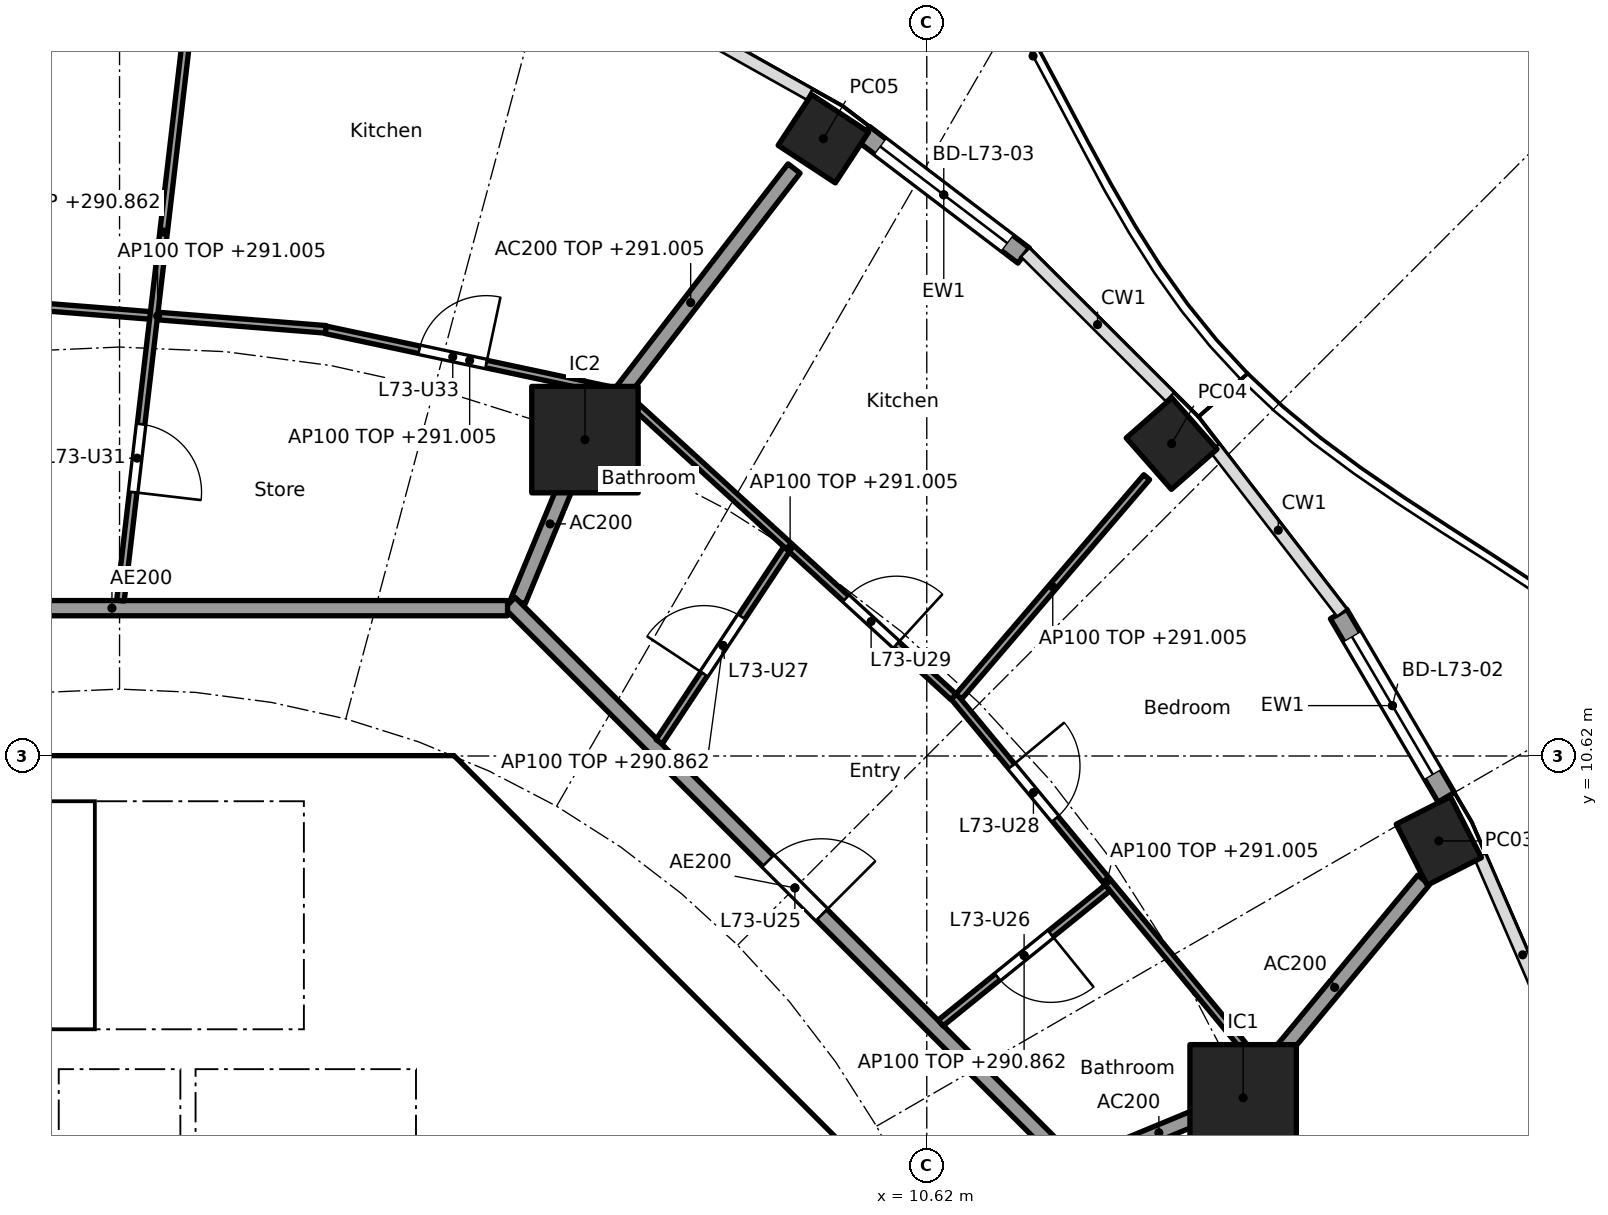
"""IFC4 building model, lengths in metres.
Left out: names, types, materials, properties, quantities, classifications, styles, units other than length and angle.
Written with IfcOpenShell. Run it as: python <this file> out.ifc"""

import sys

from ifc_helpers import new_model, si_unit, direction, frame, frame_2d, origin, origin_2d, place, context, subcontext, project, spatial, polyline, rectangle, hollow_rectangle, outline, extrude, element, fill, save


model = new_model("IFC4")
c1 = context("Model", 3, precision=1e-05, world=origin(), true_north=direction((0.0, 1.0)))
c2 = subcontext(c1, "Body", "Model", "MODEL_VIEW")
j1 = project(units=[si_unit("LENGTHUNIT", "METRE"), si_unit("PLANEANGLEUNIT", "RADIAN")], contexts=[c1])
p1 = place(None, origin())
s1 = spatial("IfcSite", under=j1, at=p1, CompositionType="ELEMENT")
p2 = place(p1, origin())
s2 = spatial("IfcBuilding", under=s1, at=p2, CompositionType="ELEMENT")
p3 = place(p2, frame((0.0, 0.0, 288.1)))
s3 = spatial("IfcBuildingStorey", under=s2, at=p3, CompositionType="ELEMENT", Elevation=288.1)
for number, where, z_axis, x_axis in (
    (1, (17.356, 9.502, 0.0), (0.0, 0.0, 1.0), (-0.452, 0.892, 0.0)),
    (2, (13.841, 14.73, 0.0), (0.0, 0.0, 1.0), (-0.66, 0.751, 0.0)),
    (3, (9.26, 18.741, 0.0), (0.0, 0.0, 1.0), (-0.836, 0.549, 0.0)),
):
    element("IfcColumn", number, at=place(p3, frame(where, z_axis=z_axis, x_axis=x_axis)), inside=s3, PredefinedType="COLUMN", context=c2, shape_type="SweptSolid", body=[
        extrude(hollow_rectangle(XDim=0.9, YDim=0.8, WallThickness=0.028, at=origin_2d()), origin(), (0.0, 0.0, 1.0), 3.7),
    ])
for number, where, z_axis, x_axis in (
    (4, (14.782, 6.123, 0.0), (0.0, 0.0, 1.0), (1.0, 0.0, 0.0)),
    (5, (6.123, 14.782, 0.0), (0.0, 0.0, 1.0), (1.0, 0.0, 0.0)),
):
    element("IfcColumn", number, at=place(p3, frame(where, z_axis=z_axis, x_axis=x_axis)), inside=s3, PredefinedType="COLUMN", context=c2, shape_type="SweptSolid", body=[
        extrude(rectangle(XDim=1.4, YDim=1.4, at=origin_2d()), origin(), (0.0, 0.0, 1.0), 3.7),
    ])
p4 = place(p3, frame((16.038, 12.489, 0.0), z_axis=(0.0, 0.0, 1.0), x_axis=(0.506371364425, -0.862315511452, 0.0)))
e6 = element("IfcWall", 6, at=p4, inside=s3, PredefinedType="SOLIDWALL", context=c2, shape_type="SweptSolid", body=[
    extrude(rectangle(XDim=2.796, YDim=0.25, at=frame_2d((1.398, 0.0))), origin(), (0.0, 0.0, 1.0), 3.44),
])
p5 = place(p4, frame((0.348, 0.0, 0.0)))
e7 = element("IfcOpeningElement", 7, at=p5, cuts=e6, PredefinedType="OPENING", context=c2, shape_type="SweptSolid", body=[
    extrude(rectangle(XDim=2.1, YDim=2.4, at=frame_2d((1.05, 1.2))), frame((0.0, 0.135, 0.0), z_axis=(0.0, -1.0, 0.0), x_axis=(1.0, 0.0, 0.0)), (0.0, 0.0, 1.0), 0.27),
])
p6 = place(p3, frame((9.792, 18.802, 0.0), z_axis=(0.0, 0.0, 1.0), x_axis=(0.796010739377, -0.605282498339, 0.0)))
e8 = element("IfcWall", 8, at=p6, inside=s3, PredefinedType="SOLIDWALL", context=c2, shape_type="SweptSolid", body=[
    extrude(rectangle(XDim=2.641, YDim=0.25, at=frame_2d((1.32, 0.0))), origin(), (0.0, 0.0, 1.0), 3.44),
])
p7 = place(p6, frame((0.27, 0.0, 0.0)))
e9 = element("IfcOpeningElement", 9, at=p7, cuts=e8, PredefinedType="OPENING", context=c2, shape_type="SweptSolid", body=[
    extrude(rectangle(XDim=2.1, YDim=2.4, at=frame_2d((1.05, 1.2))), frame((0.0, 0.135, 0.0), z_axis=(0.0, -1.0, 0.0), x_axis=(1.0, 0.0, 0.0)), (0.0, 0.0, 1.0), 0.27),
])
p8 = place(p3, frame((9.988, 4.613, 0.0), z_axis=(0.0, 0.0, 1.0), x_axis=(-0.707106781187, 0.707106781187, 0.0)))
e10 = element("IfcWall", 10, at=p8, inside=s3, PredefinedType="SHEAR", context=c2, shape_type="SweptSolid", body=[
    extrude(rectangle(XDim=7.602, YDim=0.6, at=frame_2d((3.801, 0.0))), origin(), (0.0, 0.0, 1.0), 3.44),
])
p9 = place(p8, frame((3.201, 0.0, 0.0)))
e11 = element("IfcOpeningElement", 11, at=p9, cuts=e10, PredefinedType="OPENING", context=c2, shape_type="SweptSolid", body=[
    extrude(rectangle(XDim=1.2, YDim=2.1, at=frame_2d((0.6, 1.05))), frame((0.0, 0.31, 0.0), z_axis=(0.0, -1.0, 0.0), x_axis=(1.0, 0.0, 0.0)), (0.0, 0.0, 1.0), 0.62),
])
p10 = place(p3, frame((4.0, 4.3, 0.0), z_axis=(0.0, 0.0, 1.0), x_axis=(0.0, 1.0, 0.0)))
e12 = element("IfcWall", 12, at=p10, inside=s3, PredefinedType="SOLIDWALL", context=c2, shape_type="SweptSolid", body=[
    extrude(rectangle(XDim=2.2, YDim=0.2, at=frame_2d((1.1, 0.0))), origin(), (0.0, 0.0, 1.0), 3.44),
])
p11 = place(p10, frame((0.55, 0.0, 0.0)))
e13 = element("IfcOpeningElement", 13, at=p11, cuts=e12, PredefinedType="OPENING", context=c2, shape_type="SweptSolid", body=[
    extrude(rectangle(XDim=1.1, YDim=2.1, at=frame_2d((0.55, 1.05))), frame((0.0, 0.11, 0.0), z_axis=(0.0, -1.0, 0.0), x_axis=(1.0, 0.0, 0.0)), (0.0, 0.0, 1.0), 0.22),
])
p12 = place(p3, frame((4.0, 7.025, 0.0), z_axis=(0.0, 0.0, 1.0), x_axis=(0.0, 1.0, 0.0)))
e14 = element("IfcWall", 14, at=p12, inside=s3, PredefinedType="SOLIDWALL", context=c2, shape_type="SweptSolid", body=[
    extrude(rectangle(XDim=3.0, YDim=0.2, at=frame_2d((1.5, 0.0))), origin(), (0.0, 0.0, 1.0), 3.44),
])
p13 = place(p12, frame((0.925, 0.0, 0.0)))
e15 = element("IfcOpeningElement", 15, at=p13, cuts=e14, PredefinedType="OPENING", context=c2, shape_type="SweptSolid", body=[
    extrude(rectangle(XDim=1.1, YDim=2.1, at=frame_2d((0.55, 1.05))), frame((0.0, 0.11, 0.0), z_axis=(0.0, -1.0, 0.0), x_axis=(1.0, 0.0, 0.0)), (0.0, 0.0, 1.0), 0.22),
])
p14 = place(p3, origin())
e16 = element("IfcWall", 16, at=p14, inside=s3, PredefinedType="SHEAR", context=c2, shape_type="SweptSolid", body=[
    extrude(outline(polyline([(-4.152, 10.025), (-4.401, 9.776), (-4.825, 10.2), (-4.401, 10.625), (4.401, 10.625), (4.825, 10.2), (4.401, 9.776), (4.152, 10.025), (-4.152, 10.025)])), origin(), (0.0, 0.0, 1.0), 3.44),
])
for number, where, z_axis, x_axis in (
    (17, (-0.9, 4.3, 0.0), (0.0, 0.0, 1.0), (0.0, 1.0, 0.0)),
    (18, (0.9, 4.3, 0.0), (0.0, 0.0, 1.0), (0.0, 1.0, 0.0)),
):
    element("IfcWall", number, at=place(p3, frame(where, z_axis=z_axis, x_axis=x_axis)), inside=s3, PredefinedType="SOLIDWALL", context=c2, shape_type="SweptSolid", body=[
        extrude(rectangle(XDim=2.2, YDim=0.2, at=frame_2d((1.1, 0.0))), origin(), (0.0, 0.0, 1.0), 3.44),
    ])
p15 = place(p3, origin())
e19 = element("IfcWall", 19, at=p15, inside=s3, PredefinedType="SOLIDWALL", context=c2, shape_type="SweptSolid", body=[
    extrude(outline(polyline([(4.1, 6.5), (-4.1, 6.5), (-4.1, 7.025), (4.1, 7.025), (4.1, 6.5)])), origin(), (0.0, 0.0, 1.0), 3.44),
])
p16 = place(p3, frame((12.657, 5.243, 0.0), z_axis=(0.0, 0.0, 1.0), x_axis=(0.923853160736, 0.382747093259, 0.0)))
e20 = element("IfcWall", 20, at=p16, inside=s3, PredefinedType="PARTITIONING", context=c2, shape_type="SweptSolid", body=[
    extrude(rectangle(XDim=2.2, YDim=0.2, at=frame_2d((1.1, 0.0))), origin(), (0.0, 0.0, 1.0), 3.44),
])
p17 = place(p3, frame((14.814, 6.161, 0.0), z_axis=(0.0, 0.0, 1.0), x_axis=(0.638050520313, 0.769994502272, 0.0)))
e21 = element("IfcWall", 21, at=p17, inside=s3, PredefinedType="PARTITIONING", context=c2, shape_type="SweptSolid", body=[
    extrude(rectangle(XDim=3.673, YDim=0.2, at=frame_2d((1.836, 0.0))), origin(), (0.0, 0.0, 1.0), 3.44),
])
p18 = place(p3, frame((5.243, 12.657, 0.0), z_axis=(0.0, 0.0, 1.0), x_axis=(0.382691608661, 0.923876145736, 0.0)))
e22 = element("IfcWall", 22, at=p18, inside=s3, PredefinedType="PARTITIONING", context=c2, shape_type="SweptSolid", body=[
    extrude(rectangle(XDim=2.2, YDim=0.2, at=frame_2d((1.1, 0.0))), origin(), (0.0, 0.0, 1.0), 3.44),
])
p19 = place(p3, frame((6.154, 14.822, 0.0), z_axis=(0.0, 0.0, 1.0), x_axis=(0.610687612043, 0.791871606068, 0.0)))
e23 = element("IfcWall", 23, at=p19, inside=s3, PredefinedType="PARTITIONING", context=c2, shape_type="SweptSolid", body=[
    extrude(rectangle(XDim=4.455, YDim=0.2, at=frame_2d((2.228, 0.0))), origin(), (0.0, 0.0, 1.0), 2.905),
])
p20 = place(p3, frame((12.635, 5.134, 0.0), z_axis=(0.0, 0.0, 1.0), x_axis=(-0.707106781187, 0.707106781187, 0.0)))
e24 = element("IfcWall", 24, at=p20, inside=s3, PredefinedType="PARTITIONING", context=c2, shape_type="SweptSolid", body=[
    extrude(rectangle(XDim=10.609, YDim=0.2, at=frame_2d((5.305, 0.0))), origin(), (0.0, 0.0, 1.0), 3.44),
])
p21 = place(p20, frame((4.804, 0.0, 0.0)))
e25 = element("IfcOpeningElement", 25, at=p21, cuts=e24, PredefinedType="OPENING", context=c2, shape_type="SweptSolid", body=[
    extrude(rectangle(XDim=1.0, YDim=2.1, at=frame_2d((0.5, 1.05))), frame((0.0, 0.11, 0.0), z_axis=(0.0, -1.0, 0.0), x_axis=(1.0, 0.0, 0.0)), (0.0, 0.0, 1.0), 0.22),
])
p22 = place(p3, frame((5.104, 12.565, 0.0), z_axis=(0.0, 0.0, 1.0), x_axis=(-1.0, 0.0, 0.0)))
e26 = element("IfcWall", 26, at=p22, inside=s3, PredefinedType="PARTITIONING", context=c2, shape_type="SweptSolid", body=[
    extrude(rectangle(XDim=10.409, YDim=0.2, at=frame_2d((5.205, 0.0))), origin(), (0.0, 0.0, 1.0), 3.44),
])
p23 = place(p22, frame((6.339, 0.0, 0.0)))
e27 = element("IfcOpeningElement", 27, at=p23, cuts=e26, PredefinedType="OPENING", context=c2, shape_type="SweptSolid", body=[
    extrude(rectangle(XDim=1.0, YDim=2.1, at=frame_2d((0.5, 1.05))), frame((0.0, 0.11, 0.0), z_axis=(0.0, -1.0, 0.0), x_axis=(1.0, 0.0, 0.0)), (0.0, 0.0, 1.0), 0.22),
])
p24 = place(p3, frame((15.552, 2.508, 0.0), z_axis=(0.0, 0.0, 1.0), x_axis=(-0.12196293976, 0.992534654974, 0.0)))
e28 = element("IfcWall", 28, at=p24, inside=s3, PredefinedType="PARTITIONING", context=c2, shape_type="SweptSolid", body=[
    extrude(rectangle(XDim=3.887, YDim=0.1, at=frame_2d((1.944, 0.0))), origin(), (0.0, 0.0, 1.0), 2.905),
])
p25 = place(p3, frame((15.002, 6.543, 0.0), z_axis=(0.0, 0.0, 1.0), x_axis=(-0.637932656528, 0.770092154054, 0.0)))
e29 = element("IfcWall", 29, at=p25, inside=s3, PredefinedType="PARTITIONING", context=c2, shape_type="SweptSolid", body=[
    extrude(rectangle(XDim=6.311, YDim=0.1, at=frame_2d((3.155, 0.0))), origin(), (0.0, 0.0, 1.0), 2.905),
])
p26 = place(p25, frame((4.22, 0.0, 0.0)))
e30 = element("IfcOpeningElement", 30, at=p26, cuts=e29, PredefinedType="OPENING", context=c2, shape_type="SweptSolid", body=[
    extrude(rectangle(XDim=0.9, YDim=2.1, at=frame_2d((0.45, 1.05))), frame((0.0, 0.06, 0.0), z_axis=(0.0, -1.0, 0.0), x_axis=(1.0, 0.0, 0.0)), (0.0, 0.0, 1.0), 0.12),
])
p27 = place(p3, frame((10.802, 7.107, 0.0), z_axis=(0.0, 0.0, 1.0), x_axis=(0.777526610395, 0.628850037868, 0.0)))
e31 = element("IfcWall", 31, at=p27, inside=s3, PredefinedType="PARTITIONING", context=c2, shape_type="SweptSolid", body=[
    extrude(rectangle(XDim=2.824, YDim=0.1, at=frame_2d((1.412, 0.0))), origin(), (0.0, 0.0, 1.0), 2.762),
])
p28 = place(p27, frame((0.962, 0.0, 0.0)))
e32 = element("IfcOpeningElement", 32, at=p28, cuts=e31, PredefinedType="OPENING", context=c2, shape_type="SweptSolid", body=[
    extrude(rectangle(XDim=0.9, YDim=2.1, at=frame_2d((0.45, 1.05))), frame((0.0, 0.06, 0.0), z_axis=(0.0, -1.0, 0.0), x_axis=(1.0, 0.0, 0.0)), (0.0, 0.0, 1.0), 0.12),
])
p29 = place(p3, frame((11.041, 11.402, 0.0), z_axis=(0.0, 0.0, 1.0), x_axis=(0.650558544325, 0.759456108282, 0.0)))
e33 = element("IfcWall", 33, at=p29, inside=s3, PredefinedType="PARTITIONING", context=c2, shape_type="SweptSolid", body=[
    extrude(rectangle(XDim=3.8, YDim=0.1, at=frame_2d((1.9, 0.0))), origin(), (0.0, 0.0, 1.0), 2.905),
])
p30 = place(p3, frame((10.972, 11.398, 0.0), z_axis=(0.0, 0.0, 1.0), x_axis=(-0.737830272434, 0.674986288069, 0.0)))
e34 = element("IfcWall", 34, at=p30, inside=s3, PredefinedType="PARTITIONING", context=c2, shape_type="SweptSolid", body=[
    extrude(rectangle(XDim=5.827, YDim=0.1, at=frame_2d((2.914, 0.0))), origin(), (0.0, 0.0, 1.0), 2.905),
])
p31 = place(p30, frame((1.019, 0.0, 0.0)))
e35 = element("IfcOpeningElement", 35, at=p31, cuts=e34, PredefinedType="OPENING", context=c2, shape_type="SweptSolid", body=[
    extrude(rectangle(XDim=0.9, YDim=2.1, at=frame_2d((0.45, 1.05))), frame((0.0, 0.06, 0.0), z_axis=(0.0, -1.0, 0.0), x_axis=(1.0, 0.0, 0.0)), (0.0, 0.0, 1.0), 0.12),
])
p32 = place(p3, frame((7.1, 10.808, 0.0), z_axis=(0.0, 0.0, 1.0), x_axis=(0.55204370542, 0.833815175747, 0.0)))
e36 = element("IfcWall", 36, at=p32, inside=s3, PredefinedType="PARTITIONING", context=c2, shape_type="SweptSolid", body=[
    extrude(rectangle(XDim=3.036, YDim=0.1, at=frame_2d((1.518, 0.0))), origin(), (0.0, 0.0, 1.0), 2.762),
])
p33 = place(p32, frame((1.068, 0.0, 0.0)))
e37 = element("IfcOpeningElement", 37, at=p33, cuts=e36, PredefinedType="OPENING", context=c2, shape_type="SweptSolid", body=[
    extrude(rectangle(XDim=0.9, YDim=2.1, at=frame_2d((0.45, 1.05))), frame((0.0, 0.06, 0.0), z_axis=(0.0, -1.0, 0.0), x_axis=(1.0, 0.0, 0.0)), (0.0, 0.0, 1.0), 0.12),
])
p34 = place(p3, frame((6.5, 15.419, 0.0), z_axis=(0.0, 0.0, 1.0), x_axis=(-0.978053492557, 0.208353943321, 0.0)))
e38 = element("IfcWall", 38, at=p34, inside=s3, PredefinedType="PARTITIONING", context=c2, shape_type="SweptSolid", body=[
    extrude(rectangle(XDim=3.874, YDim=0.1, at=frame_2d((1.937, 0.0))), origin(), (0.0, 0.0, 1.0), 2.905),
])
p35 = place(p34, frame((1.714, 0.0, 0.0)))
e39 = element("IfcOpeningElement", 39, at=p35, cuts=e38, PredefinedType="OPENING", context=c2, shape_type="SweptSolid", body=[
    extrude(rectangle(XDim=0.9, YDim=2.1, at=frame_2d((0.45, 1.05))), frame((0.0, 0.06, 0.0), z_axis=(0.0, -1.0, 0.0), x_axis=(1.0, 0.0, 0.0)), (0.0, 0.0, 1.0), 0.12),
])
p36 = place(p3, frame((2.713, 16.233, 0.0), z_axis=(0.0, 0.0, 1.0), x_axis=(-0.996870142942, 0.079056423588, 0.0)))
e40 = element("IfcWall", 40, at=p36, inside=s3, PredefinedType="PARTITIONING", context=c2, shape_type="SweptSolid", body=[
    extrude(rectangle(XDim=4.438, YDim=0.1, at=frame_2d((2.219, 0.0))), origin(), (0.0, 0.0, 1.0), 2.905),
])
p37 = place(p3, frame((0.012, 12.664, 0.0), z_axis=(0.0, 0.0, 1.0), x_axis=(0.11636251357, 0.993206808996, 0.0)))
e41 = element("IfcWall", 41, at=p37, inside=s3, PredefinedType="PARTITIONING", context=c2, shape_type="SweptSolid", body=[
    extrude(rectangle(XDim=9.765, YDim=0.1, at=frame_2d((4.882, 0.0))), origin(), (0.0, 0.0, 1.0), 2.762),
])
p38 = place(p37, frame((1.437, 0.0, 0.0)))
e42 = element("IfcOpeningElement", 42, at=p38, cuts=e41, PredefinedType="OPENING", context=c2, shape_type="SweptSolid", body=[
    extrude(rectangle(XDim=0.9, YDim=2.1, at=frame_2d((0.45, 1.05))), frame((0.0, 0.06, 0.0), z_axis=(0.0, -1.0, 0.0), x_axis=(1.0, 0.0, 0.0)), (0.0, 0.0, 1.0), 0.12),
])
p39 = place(p5, origin())
e43 = element("IfcDoor", 43, at=p39, inside=s3, OperationType="SLIDING_TO_LEFT", PredefinedType="DOOR", context=c2, shape_type="SweptSolid", body=[
    extrude(rectangle(XDim=2.1, YDim=2.4, at=frame_2d((1.05, 1.2))), frame((0.0, 0.025, 0.0), z_axis=(0.0, -1.0, 0.0), x_axis=(1.0, 0.0, 0.0)), (0.0, 0.0, 1.0), 0.05),
])
fill(e7, e43)
p40 = place(p7, origin())
e44 = element("IfcDoor", 44, at=p40, inside=s3, OperationType="SLIDING_TO_LEFT", PredefinedType="DOOR", context=c2, shape_type="SweptSolid", body=[
    extrude(rectangle(XDim=2.1, YDim=2.4, at=frame_2d((1.05, 1.2))), frame((0.0, 0.025, 0.0), z_axis=(0.0, -1.0, 0.0), x_axis=(1.0, 0.0, 0.0)), (0.0, 0.0, 1.0), 0.05),
])
fill(e9, e44)
p41 = place(p11, origin())
e45 = element("IfcDoor", 45, at=p41, inside=s3, OperationType="DOUBLE_DOOR_SLIDING", PredefinedType="DOOR", context=c2, shape_type="SweptSolid", body=[
    extrude(rectangle(XDim=1.1, YDim=2.1, at=frame_2d((0.55, 1.05))), frame((0.0, 0.025, 0.0), z_axis=(0.0, -1.0, 0.0), x_axis=(1.0, 0.0, 0.0)), (0.0, 0.0, 1.0), 0.05),
])
fill(e13, e45)
p42 = place(p13, origin())
e46 = element("IfcDoor", 46, at=p42, inside=s3, OperationType="SINGLE_SWING_LEFT", PredefinedType="DOOR", context=c2, shape_type="SweptSolid", body=[
    extrude(rectangle(XDim=1.1, YDim=2.1, at=frame_2d((0.55, 1.05))), frame((0.0, 0.025, 0.0), z_axis=(0.0, -1.0, 0.0), x_axis=(1.0, 0.0, 0.0)), (0.0, 0.0, 1.0), 0.05),
])
fill(e15, e46)
p43 = place(p9, origin())
e47 = element("IfcDoor", 47, at=p43, inside=s3, OperationType="SINGLE_SWING_LEFT", PredefinedType="DOOR", context=c2, shape_type="SweptSolid", body=[
    extrude(rectangle(XDim=1.2, YDim=2.1, at=frame_2d((0.6, 1.05))), frame((0.0, 0.025, 0.0), z_axis=(0.0, -1.0, 0.0), x_axis=(1.0, 0.0, 0.0)), (0.0, 0.0, 1.0), 0.05),
])
fill(e11, e47)
p44 = place(p21, frame((1.0, 0.0, 0.0), x_axis=(-1.0, 0.0, 0.0)))
e48 = element("IfcDoor", 48, at=p44, inside=s3, OperationType="SINGLE_SWING_RIGHT", PredefinedType="DOOR", context=c2, shape_type="SweptSolid", body=[
    extrude(rectangle(XDim=1.0, YDim=2.1, at=frame_2d((0.5, 1.05))), frame((0.0, 0.025, 0.0), z_axis=(0.0, -1.0, 0.0), x_axis=(1.0, 0.0, 0.0)), (0.0, 0.0, 1.0), 0.05),
])
fill(e25, e48)
p45 = place(p28, frame((0.9, 0.0, 0.0), x_axis=(-1.0, 0.0, 0.0)))
e49 = element("IfcDoor", 49, at=p45, inside=s3, OperationType="SINGLE_SWING_LEFT", PredefinedType="DOOR", context=c2, shape_type="SweptSolid", body=[
    extrude(rectangle(XDim=0.9, YDim=2.1, at=frame_2d((0.45, 1.05))), frame((0.0, 0.025, 0.0), z_axis=(0.0, -1.0, 0.0), x_axis=(1.0, 0.0, 0.0)), (0.0, 0.0, 1.0), 0.05),
])
fill(e32, e49)
p46 = place(p33, origin())
e50 = element("IfcDoor", 50, at=p46, inside=s3, OperationType="SINGLE_SWING_LEFT", PredefinedType="DOOR", context=c2, shape_type="SweptSolid", body=[
    extrude(rectangle(XDim=0.9, YDim=2.1, at=frame_2d((0.45, 1.05))), frame((0.0, 0.025, 0.0), z_axis=(0.0, -1.0, 0.0), x_axis=(1.0, 0.0, 0.0)), (0.0, 0.0, 1.0), 0.05),
])
fill(e37, e50)
p47 = place(p26, frame((0.9, 0.0, 0.0), x_axis=(-1.0, 0.0, 0.0)))
e51 = element("IfcDoor", 51, at=p47, inside=s3, OperationType="SINGLE_SWING_LEFT", PredefinedType="DOOR", context=c2, shape_type="SweptSolid", body=[
    extrude(rectangle(XDim=0.9, YDim=2.1, at=frame_2d((0.45, 1.05))), frame((0.0, 0.025, 0.0), z_axis=(0.0, -1.0, 0.0), x_axis=(1.0, 0.0, 0.0)), (0.0, 0.0, 1.0), 0.05),
])
fill(e30, e51)
p48 = place(p31, frame((0.9, 0.0, 0.0), x_axis=(-1.0, 0.0, 0.0)))
e52 = element("IfcDoor", 52, at=p48, inside=s3, OperationType="SINGLE_SWING_RIGHT", PredefinedType="DOOR", context=c2, shape_type="SweptSolid", body=[
    extrude(rectangle(XDim=0.9, YDim=2.1, at=frame_2d((0.45, 1.05))), frame((0.0, 0.025, 0.0), z_axis=(0.0, -1.0, 0.0), x_axis=(1.0, 0.0, 0.0)), (0.0, 0.0, 1.0), 0.05),
])
fill(e35, e52)
p49 = place(p38, frame((0.9, 0.0, 0.0), x_axis=(-1.0, 0.0, 0.0)))
e53 = element("IfcDoor", 53, at=p49, inside=s3, OperationType="SINGLE_SWING_RIGHT", PredefinedType="DOOR", context=c2, shape_type="SweptSolid", body=[
    extrude(rectangle(XDim=0.9, YDim=2.1, at=frame_2d((0.45, 1.05))), frame((0.0, 0.025, 0.0), z_axis=(0.0, -1.0, 0.0), x_axis=(1.0, 0.0, 0.0)), (0.0, 0.0, 1.0), 0.05),
])
fill(e42, e53)
p50 = place(p35, frame((0.9, 0.0, 0.0), x_axis=(-1.0, 0.0, 0.0)))
e54 = element("IfcDoor", 54, at=p50, inside=s3, OperationType="SINGLE_SWING_RIGHT", PredefinedType="DOOR", context=c2, shape_type="SweptSolid", body=[
    extrude(rectangle(XDim=0.9, YDim=2.1, at=frame_2d((0.45, 1.05))), frame((0.0, 0.025, 0.0), z_axis=(0.0, -1.0, 0.0), x_axis=(1.0, 0.0, 0.0)), (0.0, 0.0, 1.0), 0.05),
])
fill(e39, e54)
save(model, sys.argv[1])
